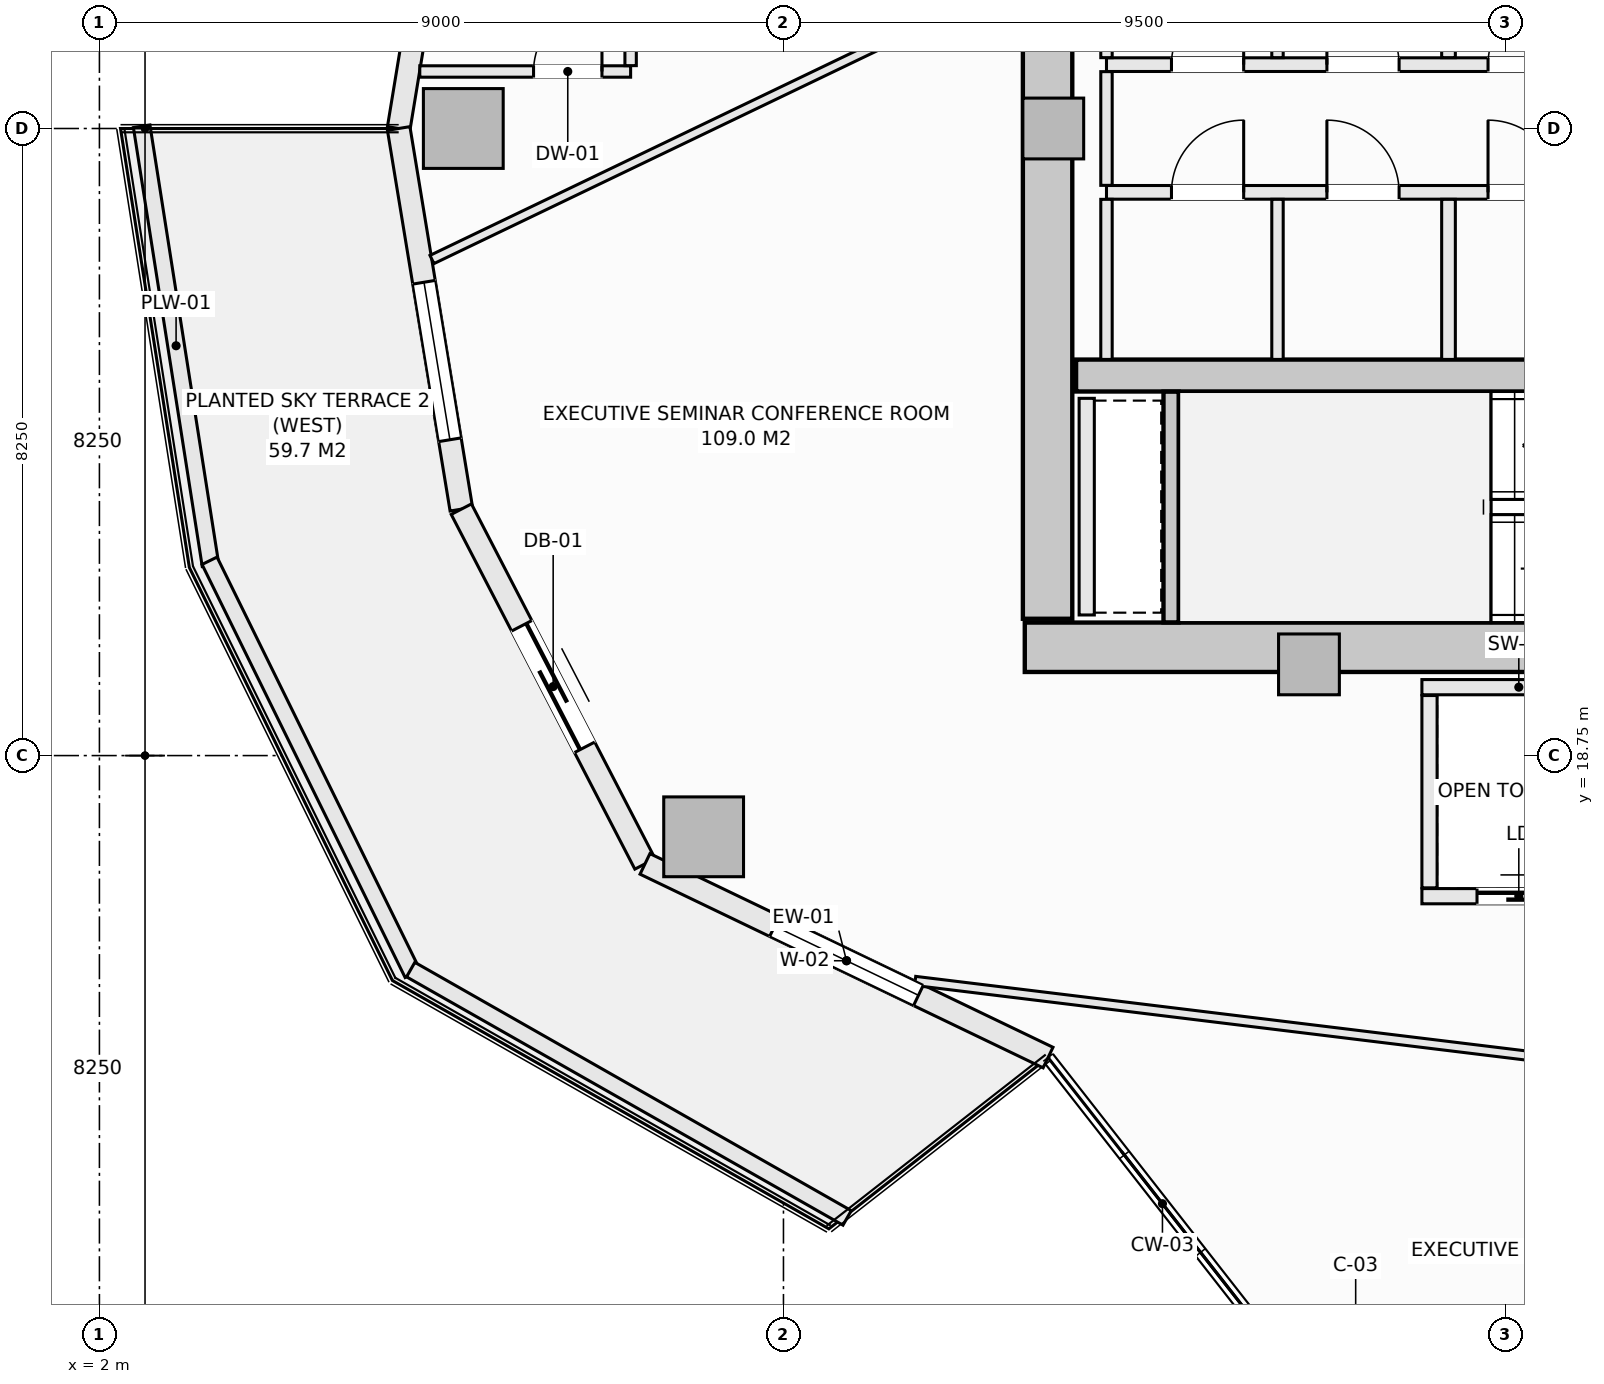
"""IFC4 building model, lengths in metres.
Left out: names, types, materials, properties, quantities, classifications, styles, units other than length and angle.
Written with IfcOpenShell. Run it as: python <this file> out.ifc"""

import sys

from ifc_helpers import new_model, si_unit, direction, frame, frame_2d, origin, origin_2d, place, context, subcontext, project, spatial, rectangle, extrude, element, fill, save


model = new_model("IFC4")
c1 = context("Model", 3, precision=1e-05, world=origin(), true_north=direction((0.0, 1.0)))
c2 = subcontext(c1, "Body", "Model", "MODEL_VIEW")
j1 = project(units=[si_unit("LENGTHUNIT", "METRE"), si_unit("PLANEANGLEUNIT", "RADIAN")], contexts=[c1])
p1 = place(None, origin())
s1 = spatial("IfcSite", under=j1, at=p1, CompositionType="ELEMENT")
p2 = place(p1, origin())
s2 = spatial("IfcBuilding", under=s1, at=p2, CompositionType="ELEMENT")
p3 = place(p2, frame((0.0, 0.0, 122.3)))
s3 = spatial("IfcBuildingStorey", under=s2, at=p3, CompositionType="ELEMENT", Elevation=122.3)
p4 = place(p3, frame((14.175, 20.175, -0.27), z_axis=(0.0, 0.0, 1.0), x_axis=(1.0, 0.0, 0.0)))
e1 = element("IfcWall", 1, at=p4, inside=s3, PredefinedType="SHEAR", context=c2, shape_type="SweptSolid", body=[
    extrude(rectangle(XDim=13.65, YDim=0.65, at=frame_2d((6.825, 0.0))), origin(), (0.0, 0.0, 1.0), 3.4),
])
p5 = place(p3, frame((14.475, 20.55, -0.27), z_axis=(0.0, 0.0, 1.0), x_axis=(0.0, 1.0, 0.0)))
e2 = element("IfcWall", 2, at=p5, inside=s3, PredefinedType="SHEAR", context=c2, shape_type="SweptSolid", body=[
    extrude(rectangle(XDim=12.9, YDim=0.65, at=frame_2d((6.45, 0.0))), origin(), (0.0, 0.0, 1.0), 3.4),
])
p6 = place(p3, frame((14.85, 23.75, -0.27), z_axis=(0.0, 0.0, 1.0), x_axis=(1.0, 0.0, 0.0)))
e3 = element("IfcWall", 3, at=p6, inside=s3, PredefinedType="SHEAR", context=c2, shape_type="SweptSolid", body=[
    extrude(rectangle(XDim=7.3, YDim=0.42, at=frame_2d((3.65, 0.0))), origin(), (0.0, 0.0, 1.0), 3.4),
])
for number, where, z_axis, x_axis in (
    (4, (6.788, 27.0, -0.27), (0.0, 0.0, 1.0), (1.0, 0.0, 0.0)),
    (5, (9.95, 17.681, -0.27), (0.0, 0.0, 1.0), (1.0, 0.0, 0.0)),
):
    element("IfcColumn", number, at=place(p3, frame(where, z_axis=z_axis, x_axis=x_axis)), inside=s3, PredefinedType="COLUMN", context=c2, shape_type="SweptSolid", body=[
        extrude(rectangle(XDim=1.05, YDim=1.05, at=origin_2d()), origin(), (0.0, 0.0, 1.0), 3.4),
    ])
for number, where, z_axis, x_axis in (
    (6, (14.55, 27.0, -0.27), (0.0, 0.0, 1.0), (1.0, 0.0, 0.0)),
    (7, (17.914, 19.95, -0.27), (0.0, 0.0, 1.0), (1.0, 0.0, 0.0)),
):
    element("IfcColumn", number, at=place(p3, frame(where, z_axis=z_axis, x_axis=x_axis)), inside=s3, PredefinedType="PILASTER", context=c2, shape_type="SweptSolid", body=[
        extrude(rectangle(XDim=0.8, YDim=0.8, at=origin_2d()), origin(), (0.0, 0.0, 1.0), 3.4),
    ])
p7 = place(p3, frame((5.938, 27.0, 0.0), z_axis=(0.0, 0.0, 1.0), x_axis=(0.162393944769, 0.986726003864, 0.0)))
e8 = element("IfcWall", 8, at=p7, inside=s3, PredefinedType="SOLIDWALL", context=c2, shape_type="SweptSolid", body=[
    extrude(rectangle(XDim=5.075, YDim=0.3, at=frame_2d((2.538, 0.0))), origin(), (0.0, 0.0, 1.0), 2.653),
])
p8 = place(p7, frame((2.039, 0.0, 0.74)))
e9 = element("IfcOpeningElement", 9, at=p8, cuts=e8, PredefinedType="OPENING", context=c2, shape_type="SweptSolid", body=[
    extrude(rectangle(XDim=1.2, YDim=1.7, at=frame_2d((0.6, 0.85))), frame((0.0, 0.16, 0.0), z_axis=(0.0, -1.0, 0.0), x_axis=(1.0, 0.0, 0.0)), (0.0, 0.0, 1.0), 0.32),
])
p9 = place(p7, frame((3.51, 0.0, 0.74)))
e10 = element("IfcOpeningElement", 10, at=p9, cuts=e8, PredefinedType="OPENING", context=c2, shape_type="SweptSolid", body=[
    extrude(rectangle(XDim=1.2, YDim=1.7, at=frame_2d((0.6, 0.85))), frame((0.0, 0.16, 0.0), z_axis=(0.0, -1.0, 0.0), x_axis=(1.0, 0.0, 0.0)), (0.0, 0.0, 1.0), 0.32),
])
p10 = place(p3, frame((5.938, 27.0, 0.0), z_axis=(0.0, 0.0, 1.0), x_axis=(0.162393944769, -0.986726003864, 0.0)))
e11 = element("IfcWall", 11, at=p10, inside=s3, PredefinedType="SOLIDWALL", context=c2, shape_type="SweptSolid", body=[
    extrude(rectangle(XDim=5.075, YDim=0.3, at=frame_2d((2.538, 0.0))), origin(), (0.0, 0.0, 1.0), 2.653),
])
p11 = place(p10, frame((2.05, 0.0, 0.74)))
e12 = element("IfcOpeningElement", 12, at=p11, cuts=e11, PredefinedType="OPENING", context=c2, shape_type="SweptSolid", body=[
    extrude(rectangle(XDim=2.1, YDim=1.7, at=frame_2d((1.05, 0.85))), frame((0.0, 0.16, 0.0), z_axis=(0.0, -1.0, 0.0), x_axis=(1.0, 0.0, 0.0)), (0.0, 0.0, 1.0), 0.32),
])
p12 = place(p3, frame((6.762, 21.992, 0.0), z_axis=(0.0, 0.0, 1.0), x_axis=(0.459767899643, -0.888039119892, 0.0)))
e13 = element("IfcWall", 13, at=p12, inside=s3, PredefinedType="SOLIDWALL", context=c2, shape_type="SweptSolid", body=[
    extrude(rectangle(XDim=5.255, YDim=0.3, at=frame_2d((2.628, 0.0))), origin(), (0.0, 0.0, 1.0), 2.653),
])
p13 = place(p12, frame((1.728, 0.0, 0.0)))
e14 = element("IfcOpeningElement", 14, at=p13, cuts=e13, PredefinedType="OPENING", context=c2, shape_type="SweptSolid", body=[
    extrude(rectangle(XDim=1.8, YDim=2.25, at=frame_2d((0.9, 1.125))), frame((0.0, 0.16, 0.0), z_axis=(0.0, -1.0, 0.0), x_axis=(1.0, 0.0, 0.0)), (0.0, 0.0, 1.0), 0.32),
])
p14 = place(p3, frame((9.178, 17.325, 0.0), z_axis=(0.0, 0.0, 1.0), x_axis=(0.901370184739, -0.433049408339, 0.0)))
e15 = element("IfcWall", 15, at=p14, inside=s3, PredefinedType="SOLIDWALL", context=c2, shape_type="SweptSolid", body=[
    extrude(rectangle(XDim=5.884, YDim=0.3, at=frame_2d((2.942, 0.0))), origin(), (0.0, 0.0, 1.0), 2.653),
])
p15 = place(p14, frame((1.892, 0.0, 0.74)))
e16 = element("IfcOpeningElement", 16, at=p15, cuts=e15, PredefinedType="OPENING", context=c2, shape_type="SweptSolid", body=[
    extrude(rectangle(XDim=2.1, YDim=1.7, at=frame_2d((1.05, 0.85))), frame((0.0, 0.16, 0.0), z_axis=(0.0, -1.0, 0.0), x_axis=(1.0, 0.0, 0.0)), (0.0, 0.0, 1.0), 0.32),
])
p16 = place(p3, frame((2.556, 27.029, 0.0), z_axis=(0.0, 0.0, 1.0), x_axis=(0.154903030247, -0.987929679289, 0.0)))
e17 = element("IfcWall", 17, at=p16, inside=s3, PredefinedType="PARAPET", context=c2, shape_type="SweptSolid", body=[
    extrude(rectangle(XDim=5.846, YDim=0.22, at=frame_2d((2.923, 0.0))), origin(), (0.0, 0.0, 1.0), 0.52),
])
p17 = place(p3, frame((3.449, 21.313, 0.0), z_axis=(0.0, 0.0, 1.0), x_axis=(0.441269631716, -0.897374566235, 0.0)))
e18 = element("IfcWall", 18, at=p17, inside=s3, PredefinedType="PARAPET", context=c2, shape_type="SweptSolid", body=[
    extrude(rectangle(XDim=6.056, YDim=0.22, at=frame_2d((3.028, 0.0))), origin(), (0.0, 0.0, 1.0), 0.52),
])
p18 = place(p3, frame((6.095, 15.934, 0.0), z_axis=(0.0, 0.0, 1.0), x_axis=(0.869187658335, -0.494482370361, 0.0)))
e19 = element("IfcWall", 19, at=p18, inside=s3, PredefinedType="PARAPET", context=c2, shape_type="SweptSolid", body=[
    extrude(rectangle(XDim=6.606, YDim=0.22, at=frame_2d((3.303, 0.0))), origin(), (0.0, 0.0, 1.0), 0.52),
])
p19 = place(p3, frame((16.1, 20.502, -0.27), z_axis=(0.0, 0.0, 1.0), x_axis=(0.0, 1.0, 0.0)))
e20 = element("IfcWall", 20, at=p19, inside=s3, PredefinedType="SHEAR", context=c2, shape_type="SweptSolid", body=[
    extrude(rectangle(XDim=3.036, YDim=0.2, at=frame_2d((1.518, 0.0))), origin(), (0.0, 0.0, 1.0), 3.4),
])
p20 = place(p3, frame((19.4, 19.65, 0.0), z_axis=(0.0, 0.0, 1.0), x_axis=(1.0, 0.0, 0.0)))
e21 = element("IfcWall", 21, at=p20, inside=s3, PredefinedType="SOLIDWALL", context=c2, shape_type="SweptSolid", body=[
    extrude(rectangle(XDim=2.55, YDim=0.2, at=frame_2d((1.275, 0.0))), origin(), (0.0, 0.0, 1.0), 3.13),
])
p21 = place(p3, frame((19.4, 16.9, 0.0), z_axis=(0.0, 0.0, 1.0), x_axis=(1.0, 0.0, 0.0)))
e22 = element("IfcWall", 22, at=p21, inside=s3, PredefinedType="SOLIDWALL", context=c2, shape_type="SweptSolid", body=[
    extrude(rectangle(XDim=2.55, YDim=0.2, at=frame_2d((1.275, 0.0))), origin(), (0.0, 0.0, 1.0), 3.13),
])
p22 = place(p21, frame((0.725, 0.0, 0.0)))
e23 = element("IfcOpeningElement", 23, at=p22, cuts=e22, PredefinedType="OPENING", context=c2, shape_type="SweptSolid", body=[
    extrude(rectangle(XDim=1.1, YDim=2.2, at=frame_2d((0.55, 1.1))), frame((0.0, 0.11, 0.0), z_axis=(0.0, -1.0, 0.0), x_axis=(1.0, 0.0, 0.0)), (0.0, 0.0, 1.0), 0.22),
])
p23 = place(p3, frame((19.5, 17.01, 0.0), z_axis=(0.0, 0.0, 1.0), x_axis=(0.0, 1.0, 0.0)))
e24 = element("IfcWall", 24, at=p23, inside=s3, PredefinedType="SOLIDWALL", context=c2, shape_type="SweptSolid", body=[
    extrude(rectangle(XDim=2.53, YDim=0.2, at=frame_2d((1.265, 0.0))), origin(), (0.0, 0.0, 1.0), 3.13),
])
p24 = place(p3, frame((14.99, 20.6, 0.0), z_axis=(0.0, 0.0, 1.0), x_axis=(0.0, 1.0, 0.0)))
e25 = element("IfcWall", 25, at=p24, inside=s3, PredefinedType="SOLIDWALL", context=c2, shape_type="SweptSolid", body=[
    extrude(rectangle(XDim=2.85, YDim=0.2, at=frame_2d((1.425, 0.0))), origin(), (0.0, 0.0, 1.0), 3.13),
])
p25 = place(p3, frame((15.25, 27.84, 0.0), z_axis=(0.0, 0.0, 1.0), x_axis=(1.0, 0.0, 0.0)))
e26 = element("IfcWall", 26, at=p25, inside=s3, PredefinedType="SOLIDWALL", context=c2, shape_type="SweptSolid", body=[
    extrude(rectangle(XDim=6.9, YDim=0.18, at=frame_2d((3.45, 0.0))), origin(), (0.0, 0.0, 1.0), 3.13),
])
p26 = place(p25, frame((5.02, 0.0, 0.0)))
e27 = element("IfcOpeningElement", 27, at=p26, cuts=e26, PredefinedType="OPENING", context=c2, shape_type="SweptSolid", body=[
    extrude(rectangle(XDim=0.95, YDim=2.1, at=frame_2d((0.475, 1.05))), frame((0.0, 0.1, 0.0), z_axis=(0.0, -1.0, 0.0), x_axis=(1.0, 0.0, 0.0)), (0.0, 0.0, 1.0), 0.2),
])
p27 = place(p25, frame((0.855, 0.0, 0.0)))
e28 = element("IfcOpeningElement", 28, at=p27, cuts=e26, PredefinedType="OPENING", context=c2, shape_type="SweptSolid", body=[
    extrude(rectangle(XDim=0.95, YDim=2.1, at=frame_2d((0.475, 1.05))), frame((0.0, 0.1, 0.0), z_axis=(0.0, -1.0, 0.0), x_axis=(1.0, 0.0, 0.0)), (0.0, 0.0, 1.0), 0.2),
])
p28 = place(p25, frame((2.9, 0.0, 0.0)))
e29 = element("IfcOpeningElement", 29, at=p28, cuts=e26, PredefinedType="OPENING", context=c2, shape_type="SweptSolid", body=[
    extrude(rectangle(XDim=0.95, YDim=2.1, at=frame_2d((0.475, 1.05))), frame((0.0, 0.1, 0.0), z_axis=(0.0, -1.0, 0.0), x_axis=(1.0, 0.0, 0.0)), (0.0, 0.0, 1.0), 0.2),
])
p29 = place(p3, frame((15.25, 26.16, 0.0), z_axis=(0.0, 0.0, 1.0), x_axis=(1.0, 0.0, 0.0)))
e30 = element("IfcWall", 30, at=p29, inside=s3, PredefinedType="SOLIDWALL", context=c2, shape_type="SweptSolid", body=[
    extrude(rectangle(XDim=6.9, YDim=0.18, at=frame_2d((3.45, 0.0))), origin(), (0.0, 0.0, 1.0), 3.13),
])
p30 = place(p29, frame((5.02, 0.0, 0.0)))
e31 = element("IfcOpeningElement", 31, at=p30, cuts=e30, PredefinedType="OPENING", context=c2, shape_type="SweptSolid", body=[
    extrude(rectangle(XDim=0.95, YDim=2.1, at=frame_2d((0.475, 1.05))), frame((0.0, 0.1, 0.0), z_axis=(0.0, -1.0, 0.0), x_axis=(1.0, 0.0, 0.0)), (0.0, 0.0, 1.0), 0.2),
])
p31 = place(p29, frame((0.855, 0.0, 0.0)))
e32 = element("IfcOpeningElement", 32, at=p31, cuts=e30, PredefinedType="OPENING", context=c2, shape_type="SweptSolid", body=[
    extrude(rectangle(XDim=0.95, YDim=2.1, at=frame_2d((0.475, 1.05))), frame((0.0, 0.1, 0.0), z_axis=(0.0, -1.0, 0.0), x_axis=(1.0, 0.0, 0.0)), (0.0, 0.0, 1.0), 0.2),
])
p32 = place(p29, frame((2.9, 0.0, 0.0)))
e33 = element("IfcOpeningElement", 33, at=p32, cuts=e30, PredefinedType="OPENING", context=c2, shape_type="SweptSolid", body=[
    extrude(rectangle(XDim=0.95, YDim=2.1, at=frame_2d((0.475, 1.05))), frame((0.0, 0.1, 0.0), z_axis=(0.0, -1.0, 0.0), x_axis=(1.0, 0.0, 0.0)), (0.0, 0.0, 1.0), 0.2),
])
p33 = place(p3, frame((15.25, 23.962, 0.0), z_axis=(0.0, 0.0, 1.0), x_axis=(0.0, 1.0, 0.0)))
e34 = element("IfcWall", 34, at=p33, inside=s3, PredefinedType="PARTITIONING", context=c2, shape_type="SweptSolid", body=[
    extrude(rectangle(XDim=2.106, YDim=0.15, at=frame_2d((1.053, 0.0))), origin(), (0.0, 0.0, 1.0), 3.13),
])
p34 = place(p3, frame((15.25, 26.252, 0.0), z_axis=(0.0, 0.0, 1.0), x_axis=(0.0, 1.0, 0.0)))
e35 = element("IfcWall", 35, at=p34, inside=s3, PredefinedType="PARTITIONING", context=c2, shape_type="SweptSolid", body=[
    extrude(rectangle(XDim=1.496, YDim=0.15, at=frame_2d((0.748, 0.0))), origin(), (0.0, 0.0, 1.0), 3.13),
])
p35 = place(p3, frame((15.25, 27.932, 0.0), z_axis=(0.0, 0.0, 1.0), x_axis=(0.0, 1.0, 0.0)))
e36 = element("IfcWall", 36, at=p35, inside=s3, PredefinedType="PARTITIONING", context=c2, shape_type="SweptSolid", body=[
    extrude(rectangle(XDim=2.106, YDim=0.15, at=frame_2d((1.053, 0.0))), origin(), (0.0, 0.0, 1.0), 3.13),
])
for number, where, z_axis, x_axis in (
    (37, (19.75, 23.962, 0.0), (0.0, 0.0, 1.0), (0.0, 1.0, 0.0)),
    (38, (19.75, 27.932, 0.0), (0.0, 0.0, 1.0), (0.0, 1.0, 0.0)),
):
    element("IfcWall", number, at=place(p3, frame(where, z_axis=z_axis, x_axis=x_axis)), inside=s3, PredefinedType="SOLIDWALL", context=c2, shape_type="SweptSolid", body=[
        extrude(rectangle(XDim=2.106, YDim=0.18, at=frame_2d((1.053, 0.0))), origin(), (0.0, 0.0, 1.0), 3.13),
    ])
for number, where, z_axis, x_axis in (
    (39, (17.5, 23.962, 0.0), (0.0, 0.0, 1.0), (0.0, 1.0, 0.0)),
    (40, (17.5, 27.932, 0.0), (0.0, 0.0, 1.0), (0.0, 1.0, 0.0)),
):
    element("IfcWall", number, at=place(p3, frame(where, z_axis=z_axis, x_axis=x_axis)), inside=s3, PredefinedType="PARTITIONING", context=c2, shape_type="SweptSolid", body=[
        extrude(rectangle(XDim=2.106, YDim=0.15, at=frame_2d((1.053, 0.0))), origin(), (0.0, 0.0, 1.0), 3.13),
    ])
p36 = place(p3, frame((6.375, 25.276, 0.0), z_axis=(0.0, 0.0, 1.0), x_axis=(0.901443069762, 0.432897669177, 0.0)))
e41 = element("IfcWall", 41, at=p36, inside=s3, PredefinedType="PARTITIONING", context=c2, shape_type="SweptSolid", body=[
    extrude(rectangle(XDim=8.623, YDim=0.12, at=frame_2d((4.311, 0.0))), origin(), (0.0, 0.0, 1.0), 2.505),
])
p37 = place(p3, frame((12.733, 15.786, 0.0), z_axis=(0.0, 0.0, 1.0), x_axis=(0.992626568422, -0.121212605212, 0.0)))
e42 = element("IfcWall", 42, at=p37, inside=s3, PredefinedType="PARTITIONING", context=c2, shape_type="SweptSolid", body=[
    extrude(rectangle(XDim=14.462, YDim=0.12, at=frame_2d((7.231, 0.0))), origin(), (0.0, 0.0, 1.0), 2.812),
])
p38 = place(p3, frame((6.215, 27.75, 0.0), z_axis=(0.0, 0.0, 1.0), x_axis=(1.0, 0.0, 0.0)))
e43 = element("IfcWall", 43, at=p38, inside=s3, PredefinedType="PARTITIONING", context=c2, shape_type="SweptSolid", body=[
    extrude(rectangle(XDim=2.774, YDim=0.15, at=frame_2d((1.387, 0.0))), origin(), (0.0, 0.0, 1.0), 3.13),
])
p39 = place(p38, frame((1.497, 0.0, 0.0)))
e44 = element("IfcOpeningElement", 44, at=p39, cuts=e43, PredefinedType="OPENING", context=c2, shape_type="SweptSolid", body=[
    extrude(rectangle(XDim=0.9, YDim=2.1, at=frame_2d((0.45, 1.05))), frame((0.0, 0.085, 0.0), z_axis=(0.0, -1.0, 0.0), x_axis=(1.0, 0.0, 0.0)), (0.0, 0.0, 1.0), 0.17),
])
p40 = place(p3, frame((8.989, 27.827, 0.0), z_axis=(0.0, 0.0, 1.0), x_axis=(0.0, 1.0, 0.0)))
e45 = element("IfcWall", 45, at=p40, inside=s3, PredefinedType="PARTITIONING", context=c2, shape_type="SweptSolid", body=[
    extrude(rectangle(XDim=2.473, YDim=0.15, at=frame_2d((1.237, 0.0))), origin(), (0.0, 0.0, 1.0), 3.13),
])
p41 = place(p11, origin())
e46 = element("IfcWindow", 46, at=p41, inside=s3, PartitioningType="SINGLE_PANEL", PredefinedType="WINDOW", context=c2, shape_type="SweptSolid", body=[
    extrude(rectangle(XDim=2.1, YDim=1.7, at=frame_2d((1.05, 0.85))), frame((0.0, 0.03, 0.0), z_axis=(0.0, -1.0, 0.0), x_axis=(1.0, 0.0, 0.0)), (0.0, 0.0, 1.0), 0.06),
])
fill(e12, e46)
p42 = place(p13, frame((1.8, 0.0, 0.0), z_axis=(0.0, 0.0, 1.0), x_axis=(-1.0, 0.0, 0.0)))
e47 = element("IfcDoor", 47, at=p42, inside=s3, OperationType="SLIDING_TO_LEFT", PredefinedType="DOOR", context=c2, shape_type="SweptSolid", body=[
    extrude(rectangle(XDim=1.8, YDim=2.25, at=frame_2d((0.9, 1.125))), frame((0.0, 0.025, 0.0), z_axis=(0.0, -1.0, 0.0), x_axis=(1.0, 0.0, 0.0)), (0.0, 0.0, 1.0), 0.05),
])
fill(e14, e47)
p43 = place(p15, origin())
e48 = element("IfcWindow", 48, at=p43, inside=s3, PartitioningType="SINGLE_PANEL", PredefinedType="WINDOW", context=c2, shape_type="SweptSolid", body=[
    extrude(rectangle(XDim=2.1, YDim=1.7, at=frame_2d((1.05, 0.85))), frame((0.0, 0.03, 0.0), z_axis=(0.0, -1.0, 0.0), x_axis=(1.0, 0.0, 0.0)), (0.0, 0.0, 1.0), 0.06),
])
fill(e16, e48)
p44 = place(p22, origin())
e49 = element("IfcDoor", 49, at=p44, inside=s3, OperationType="SLIDING_TO_LEFT", PredefinedType="DOOR", context=c2, shape_type="SweptSolid", body=[
    extrude(rectangle(XDim=1.1, YDim=2.2, at=frame_2d((0.55, 1.1))), frame((0.0, 0.025, 0.0), z_axis=(0.0, -1.0, 0.0), x_axis=(1.0, 0.0, 0.0)), (0.0, 0.0, 1.0), 0.05),
])
fill(e23, e49)
p45 = place(p26, origin())
e50 = element("IfcDoor", 50, at=p45, inside=s3, OperationType="SINGLE_SWING_RIGHT", PredefinedType="DOOR", context=c2, shape_type="SweptSolid", body=[
    extrude(rectangle(XDim=0.95, YDim=2.1, at=frame_2d((0.475, 1.05))), frame((0.0, 0.025, 0.0), z_axis=(0.0, -1.0, 0.0), x_axis=(1.0, 0.0, 0.0)), (0.0, 0.0, 1.0), 0.05),
])
fill(e27, e50)
p46 = place(p30, origin())
e51 = element("IfcDoor", 51, at=p46, inside=s3, OperationType="SINGLE_SWING_LEFT", PredefinedType="DOOR", context=c2, shape_type="SweptSolid", body=[
    extrude(rectangle(XDim=0.95, YDim=2.1, at=frame_2d((0.475, 1.05))), frame((0.0, 0.025, 0.0), z_axis=(0.0, -1.0, 0.0), x_axis=(1.0, 0.0, 0.0)), (0.0, 0.0, 1.0), 0.05),
])
fill(e31, e51)
p47 = place(p27, origin())
e52 = element("IfcDoor", 52, at=p47, inside=s3, OperationType="SINGLE_SWING_RIGHT", PredefinedType="DOOR", context=c2, shape_type="SweptSolid", body=[
    extrude(rectangle(XDim=0.95, YDim=2.1, at=frame_2d((0.475, 1.05))), frame((0.0, 0.025, 0.0), z_axis=(0.0, -1.0, 0.0), x_axis=(1.0, 0.0, 0.0)), (0.0, 0.0, 1.0), 0.05),
])
fill(e28, e52)
p48 = place(p28, origin())
e53 = element("IfcDoor", 53, at=p48, inside=s3, OperationType="SINGLE_SWING_LEFT", PredefinedType="DOOR", context=c2, shape_type="SweptSolid", body=[
    extrude(rectangle(XDim=0.95, YDim=2.1, at=frame_2d((0.475, 1.05))), frame((0.0, 0.025, 0.0), z_axis=(0.0, -1.0, 0.0), x_axis=(1.0, 0.0, 0.0)), (0.0, 0.0, 1.0), 0.05),
])
fill(e29, e53)
p49 = place(p31, origin())
e54 = element("IfcDoor", 54, at=p49, inside=s3, OperationType="SINGLE_SWING_RIGHT", PredefinedType="DOOR", context=c2, shape_type="SweptSolid", body=[
    extrude(rectangle(XDim=0.95, YDim=2.1, at=frame_2d((0.475, 1.05))), frame((0.0, 0.025, 0.0), z_axis=(0.0, -1.0, 0.0), x_axis=(1.0, 0.0, 0.0)), (0.0, 0.0, 1.0), 0.05),
])
fill(e32, e54)
p50 = place(p32, origin())
e55 = element("IfcDoor", 55, at=p50, inside=s3, OperationType="SINGLE_SWING_LEFT", PredefinedType="DOOR", context=c2, shape_type="SweptSolid", body=[
    extrude(rectangle(XDim=0.95, YDim=2.1, at=frame_2d((0.475, 1.05))), frame((0.0, 0.025, 0.0), z_axis=(0.0, -1.0, 0.0), x_axis=(1.0, 0.0, 0.0)), (0.0, 0.0, 1.0), 0.05),
])
fill(e33, e55)
p51 = place(p39, origin())
e56 = element("IfcDoor", 56, at=p51, inside=s3, OperationType="SINGLE_SWING_RIGHT", PredefinedType="DOOR", context=c2, shape_type="SweptSolid", body=[
    extrude(rectangle(XDim=0.9, YDim=2.1, at=frame_2d((0.45, 1.05))), frame((0.0, 0.025, 0.0), z_axis=(0.0, -1.0, 0.0), x_axis=(1.0, 0.0, 0.0)), (0.0, 0.0, 1.0), 0.05),
])
fill(e44, e56)
save(model, sys.argv[1])
